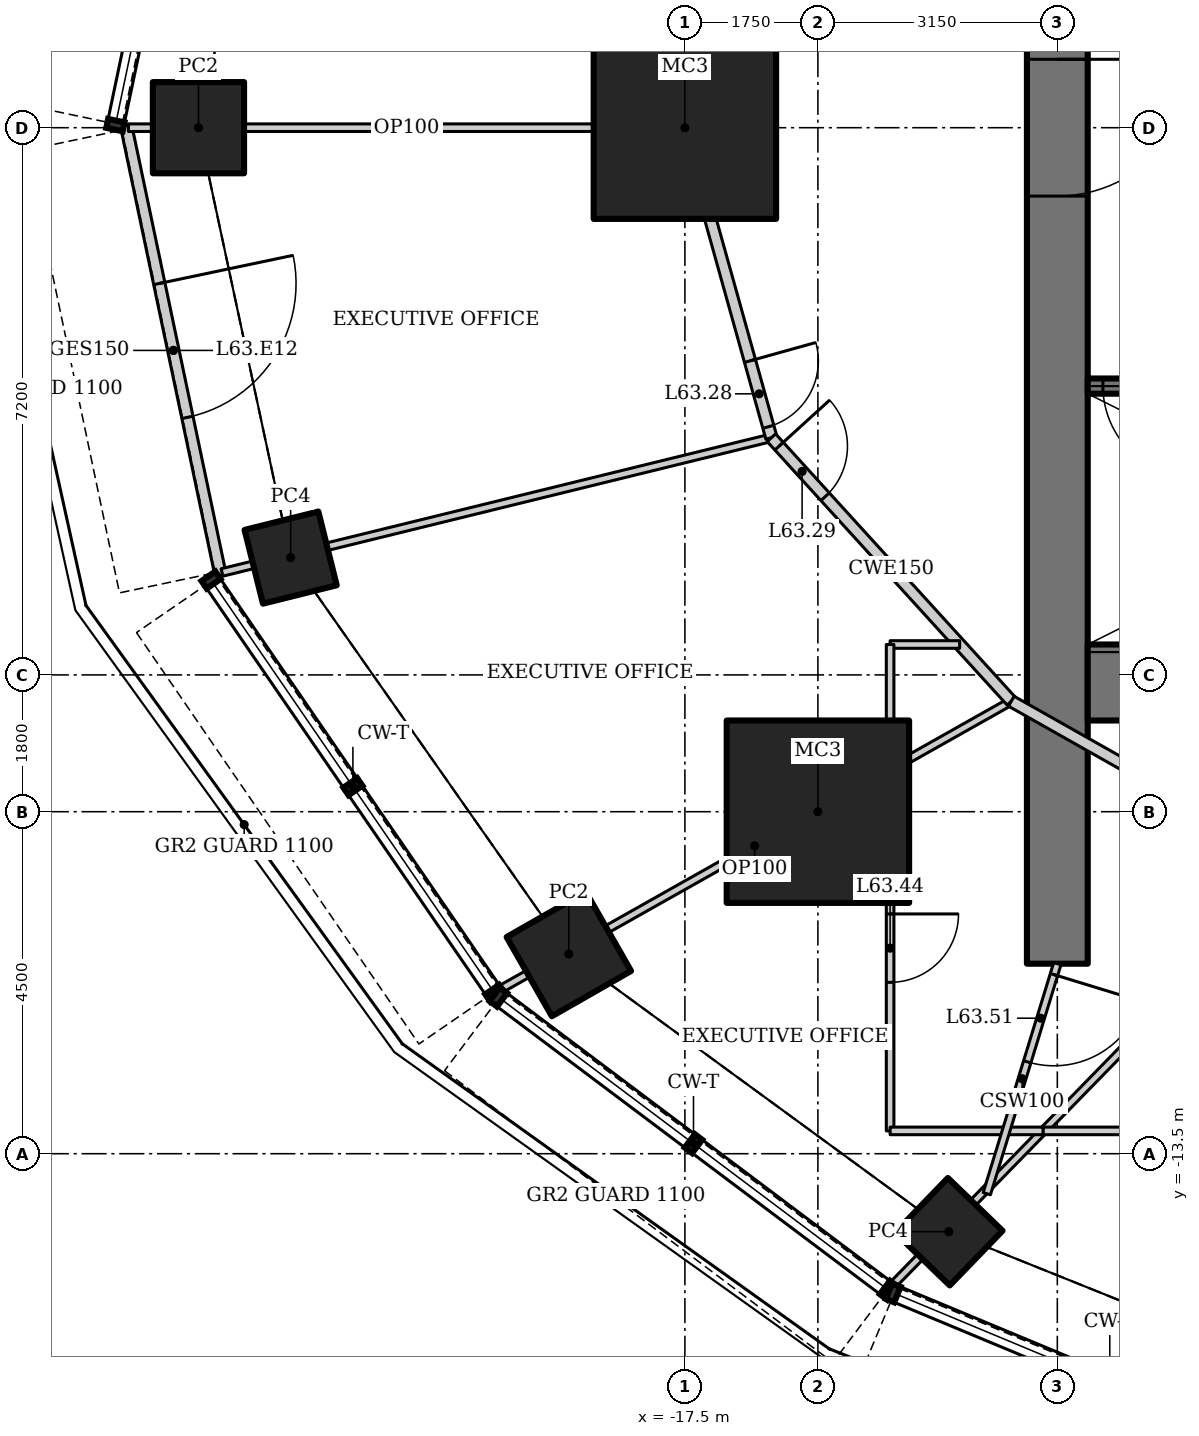
"""IFC4 building model, lengths in metres.
Left out: names, types, materials, properties, quantities, classifications, styles, units other than length and angle.
Written with IfcOpenShell. Run it as: python <this file> out.ifc"""

import sys

from ifc_helpers import new_model, si_unit, direction, frame, frame_2d, origin, origin_2d, place, context, subcontext, project, spatial, rectangle, hollow_rectangle, extrude, element, fill, save


model = new_model("IFC4")
c1 = context("Model", 3, precision=1e-05, world=origin(), true_north=direction((0.0, 1.0)))
c2 = subcontext(c1, "Body", "Model", "MODEL_VIEW")
j1 = project(units=[si_unit("LENGTHUNIT", "METRE"), si_unit("PLANEANGLEUNIT", "RADIAN")], contexts=[c1])
p1 = place(None, origin())
s1 = spatial("IfcSite", under=j1, at=p1, CompositionType="ELEMENT")
p2 = place(p1, origin())
s2 = spatial("IfcBuilding", under=s1, at=p2, CompositionType="ELEMENT")
p3 = place(p2, frame((0.0, 0.0, 270.4)))
s3 = spatial("IfcBuildingStorey", under=s2, at=p3, CompositionType="ELEMENT", Elevation=270.4)
for number, where, z_axis, x_axis in (
    (1, (-17.5, 0.0, 0.0), (0.0, 0.0, 1.0), (1.0, 0.0, 0.0)),
    (2, (-15.75, -9.0, 0.0), (0.0, 0.0, 1.0), (1.0, 0.0, 0.0)),
):
    element("IfcColumn", number, at=place(p3, frame(where, z_axis=z_axis, x_axis=x_axis)), inside=s3, PredefinedType="COLUMN", context=c2, shape_type="SweptSolid", body=[
        extrude(hollow_rectangle(XDim=2.4, YDim=2.4, WallThickness=0.12, at=origin_2d()), origin(), (0.0, 0.0, 1.0), 4.5),
    ])
p4 = place(p3, frame((-23.9, 0.0, 1.059), z_axis=(0.0, 0.0, 1.0), x_axis=(1.0, 0.0, 0.0)))
e3 = element("IfcColumn", 3, at=p4, inside=s3, PredefinedType="COLUMN", context=c2, shape_type="SweptSolid", body=[
    extrude(hollow_rectangle(XDim=1.2, YDim=1.2, WallThickness=0.1, at=origin_2d()), origin(), (0.0, 0.0, 1.0), 3.441),
])
p5 = place(p3, frame((-22.687, -5.656, 0.892), z_axis=(0.0, 0.0, 1.0), x_axis=(0.970295726276, 0.2419218956, 0.0)))
e4 = element("IfcColumn", 4, at=p5, inside=s3, PredefinedType="COLUMN", context=c2, shape_type="SweptSolid", body=[
    extrude(hollow_rectangle(XDim=1.0, YDim=1.0, WallThickness=0.08, at=origin_2d()), origin(), (0.0, 0.0, 1.0), 3.608),
])
p6 = place(p3, frame((-19.027, -10.873, 1.103), z_axis=(0.0, 0.0, 1.0), x_axis=(0.86824298017, 0.496139221777, 0.0)))
e5 = element("IfcColumn", 5, at=p6, inside=s3, PredefinedType="COLUMN", context=c2, shape_type="SweptSolid", body=[
    extrude(hollow_rectangle(XDim=1.2, YDim=1.2, WallThickness=0.1, at=origin_2d()), origin(), (0.0, 0.0, 1.0), 3.397),
])
p7 = place(p3, frame((-14.028, -14.526, 0.947), z_axis=(0.0, 0.0, 1.0), x_axis=(0.694658370459, 0.719339800339, 0.0)))
e6 = element("IfcColumn", 6, at=p7, inside=s3, PredefinedType="COLUMN", context=c2, shape_type="SweptSolid", body=[
    extrude(hollow_rectangle(XDim=1.0, YDim=1.0, WallThickness=0.08, at=origin_2d()), origin(), (0.0, 0.0, 1.0), 3.553),
])
p8 = place(p3, frame((-12.6, 11.0, 0.0), z_axis=(0.0, 0.0, 1.0), x_axis=(0.0, -1.0, 0.0)))
e7 = element("IfcWall", 7, at=p8, inside=s3, PredefinedType="SHEAR", context=c2, shape_type="SweptSolid", body=[
    extrude(rectangle(XDim=22.0, YDim=0.8, at=frame_2d((11.0, 0.0))), origin(), (0.0, 0.0, 1.0), 4.5),
])
p9 = place(p8, frame((10.1, 0.0, 0.0)))
e8 = element("IfcOpeningElement", 8, at=p9, cuts=e7, PredefinedType="OPENING", context=c2, shape_type="SweptSolid", body=[
    extrude(rectangle(XDim=1.8, YDim=2.1, at=frame_2d((0.9, 1.05))), frame((0.0, 0.41, 0.0), z_axis=(0.0, -1.0, 0.0), x_axis=(1.0, 0.0, 0.0)), (0.0, 0.0, 1.0), 0.82),
])
p10 = place(p3, frame((-12.2, -7.3, 0.0), z_axis=(0.0, 0.0, 1.0), x_axis=(1.0, 0.0, 0.0)))
e9 = element("IfcWall", 9, at=p10, inside=s3, PredefinedType="SHEAR", context=c2, shape_type="SweptSolid", body=[
    extrude(rectangle(XDim=24.4, YDim=1.0, at=frame_2d((12.2, 0.0))), origin(), (0.0, 0.0, 1.0), 4.5),
])
p11 = place(p3, frame((-5.6, -3.4, 0.0), z_axis=(0.0, 0.0, 1.0), x_axis=(-1.0, 0.0, 0.0)))
e10 = element("IfcWall", 10, at=p11, inside=s3, PredefinedType="SHEAR", context=c2, shape_type="SweptSolid", body=[
    extrude(rectangle(XDim=6.6, YDim=0.2, at=frame_2d((3.3, 0.0))), origin(), (0.0, 0.0, 1.0), 4.5),
])
p12 = place(p11, frame((5.2, 0.0, 0.0)))
e11 = element("IfcOpeningElement", 11, at=p12, cuts=e10, PredefinedType="OPENING", context=c2, shape_type="SweptSolid", body=[
    extrude(rectangle(XDim=1.2, YDim=2.1, at=frame_2d((0.6, 1.05))), frame((0.0, 0.11, 0.0), z_axis=(0.0, -1.0, 0.0), x_axis=(1.0, 0.0, 0.0)), (0.0, 0.0, 1.0), 0.22),
])
p13 = place(p3, frame((-24.853, 0.031, 0.0), z_axis=(0.0, 0.0, 1.0), x_axis=(0.20581124117, -0.978591709043, 0.0)))
e12 = element("IfcWall", 12, at=p13, inside=s3, PredefinedType="ELEMENTEDWALL", context=c2, shape_type="SweptSolid", body=[
    extrude(rectangle(XDim=6.052, YDim=0.15, at=frame_2d((3.026, 0.0))), origin(), (0.0, 0.0, 1.0), 4.35),
])
p14 = place(p13, frame((2.126, 0.0, 0.0)))
e13 = element("IfcOpeningElement", 13, at=p14, cuts=e12, PredefinedType="OPENING", context=c2, shape_type="SweptSolid", body=[
    extrude(rectangle(XDim=1.8, YDim=2.4, at=frame_2d((0.9, 1.2))), frame((0.0, 0.085, 0.0), z_axis=(0.0, -1.0, 0.0), x_axis=(1.0, 0.0, 0.0)), (0.0, 0.0, 1.0), 0.17),
])
p15 = place(p3, frame((-24.821, 0.0, 0.0), z_axis=(0.0, 0.0, 1.0), x_axis=(1.0, 0.0, 0.0)))
e14 = element("IfcWall", 14, at=p15, inside=s3, PredefinedType="PARTITIONING", context=c2, shape_type="SweptSolid", body=[
    extrude(rectangle(XDim=7.321, YDim=0.1, at=frame_2d((3.661, 0.0))), origin(), (0.0, 0.0, 1.0), 3.738),
])
p16 = place(p3, frame((-23.59, -5.852, 0.0), z_axis=(0.0, 0.0, 1.0), x_axis=(0.971221010054, 0.238180078155, 0.0)))
e15 = element("IfcWall", 15, at=p16, inside=s3, PredefinedType="PARTITIONING", context=c2, shape_type="SweptSolid", body=[
    extrude(rectangle(XDim=7.443, YDim=0.1, at=frame_2d((3.721, 0.0))), origin(), (0.0, 0.0, 1.0), 3.408),
])
p17 = place(p3, frame((-19.959, -11.355, 0.0), z_axis=(0.0, 0.0, 1.0), x_axis=(0.871035125561, 0.491220734537, 0.0)))
e16 = element("IfcWall", 16, at=p17, inside=s3, PredefinedType="PARTITIONING", context=c2, shape_type="SweptSolid", body=[
    extrude(rectangle(XDim=7.753, YDim=0.1, at=frame_2d((3.877, 0.0))), origin(), (0.0, 0.0, 1.0), 3.824),
])
p18 = place(p3, frame((-14.789, -15.251, 0.0), z_axis=(0.0, 0.0, 1.0), x_axis=(0.698752653188, 0.71536335499, 0.0)))
e17 = element("IfcWall", 17, at=p18, inside=s3, PredefinedType="PARTITIONING", context=c2, shape_type="SweptSolid", body=[
    extrude(rectangle(XDim=7.746, YDim=0.1, at=frame_2d((3.873, 0.0))), origin(), (0.0, 0.0, 1.0), 3.723),
])
p19 = place(p3, frame((-16.362, 4.08, 0.0), z_axis=(0.0, 0.0, 1.0), x_axis=(-0.268731808547, -0.963215040931, 0.0)))
e18 = element("IfcWall", 18, at=p19, inside=s3, PredefinedType="PARTITIONING", context=c2, shape_type="SweptSolid", body=[
    extrude(rectangle(XDim=4.235, YDim=0.15, at=frame_2d((2.118, 0.0))), origin(), (0.0, 0.0, 1.0), 4.35),
])
p20 = place(p19, frame((0.15, 0.0, 0.0)))
e19 = element("IfcOpeningElement", 19, at=p20, cuts=e18, PredefinedType="OPENING", context=c2, shape_type="SweptSolid", body=[
    extrude(rectangle(XDim=0.9, YDim=2.1, at=frame_2d((0.45, 1.05))), frame((0.0, 0.085, 0.0), z_axis=(0.0, -1.0, 0.0), x_axis=(1.0, 0.0, 0.0)), (0.0, 0.0, 1.0), 0.17),
])
p21 = place(p3, frame((-17.5, 0.0, 0.0), z_axis=(0.0, 0.0, 1.0), x_axis=(0.268731808547, -0.963215040931, 0.0)))
e20 = element("IfcWall", 20, at=p21, inside=s3, PredefinedType="PARTITIONING", context=c2, shape_type="SweptSolid", body=[
    extrude(rectangle(XDim=4.235, YDim=0.15, at=frame_2d((2.118, 0.0))), origin(), (0.0, 0.0, 1.0), 4.35),
])
p22 = place(p21, frame((3.185, 0.0, 0.0)))
e21 = element("IfcOpeningElement", 21, at=p22, cuts=e20, PredefinedType="OPENING", context=c2, shape_type="SweptSolid", body=[
    extrude(rectangle(XDim=0.9, YDim=2.1, at=frame_2d((0.45, 1.05))), frame((0.0, 0.085, 0.0), z_axis=(0.0, -1.0, 0.0), x_axis=(1.0, 0.0, 0.0)), (0.0, 0.0, 1.0), 0.17),
])
p23 = place(p3, frame((-16.362, -4.08, 0.0), z_axis=(0.0, 0.0, 1.0), x_axis=(0.67323765707, -0.739426167445, 0.0)))
e22 = element("IfcWall", 22, at=p23, inside=s3, PredefinedType="PARTITIONING", context=c2, shape_type="SweptSolid", body=[
    extrude(rectangle(XDim=4.688, YDim=0.15, at=frame_2d((2.344, 0.0))), origin(), (0.0, 0.0, 1.0), 4.35),
])
p24 = place(p23, frame((0.15, 0.0, 0.0)))
e23 = element("IfcOpeningElement", 23, at=p24, cuts=e22, PredefinedType="OPENING", context=c2, shape_type="SweptSolid", body=[
    extrude(rectangle(XDim=0.9, YDim=2.1, at=frame_2d((0.45, 1.05))), frame((0.0, 0.085, 0.0), z_axis=(0.0, -1.0, 0.0), x_axis=(1.0, 0.0, 0.0)), (0.0, 0.0, 1.0), 0.17),
])
p25 = place(p3, frame((-13.206, -7.546, 0.0), z_axis=(0.0, 0.0, 1.0), x_axis=(0.870593853694, -0.492002379984, 0.0)))
e24 = element("IfcWall", 24, at=p25, inside=s3, PredefinedType="PARTITIONING", context=c2, shape_type="SweptSolid", body=[
    extrude(rectangle(XDim=4.398, YDim=0.15, at=frame_2d((2.199, 0.0))), origin(), (0.0, 0.0, 1.0), 4.35),
])
p26 = place(p25, frame((3.348, 0.0, 0.0)))
e25 = element("IfcOpeningElement", 25, at=p26, cuts=e24, PredefinedType="OPENING", context=c2, shape_type="SweptSolid", body=[
    extrude(rectangle(XDim=0.9, YDim=2.1, at=frame_2d((0.45, 1.05))), frame((0.0, 0.085, 0.0), z_axis=(0.0, -1.0, 0.0), x_axis=(1.0, 0.0, 0.0)), (0.0, 0.0, 1.0), 0.17),
])
p27 = place(p3, frame((-13.885, -6.8, 0.0), z_axis=(0.0, 0.0, 1.0), x_axis=(-1.0, 0.0, 0.0)))
e26 = element("IfcWall", 26, at=p27, inside=s3, PredefinedType="PARTITIONING", context=c2, shape_type="SweptSolid", body=[
    extrude(rectangle(XDim=0.915, YDim=0.1, at=frame_2d((0.458, 0.0))), origin(), (0.0, 0.0, 1.0), 4.35),
])
p28 = place(p3, frame((-14.8, -6.8, 0.0), z_axis=(0.0, 0.0, 1.0), x_axis=(0.0, -1.0, 0.0)))
e27 = element("IfcWall", 27, at=p28, inside=s3, PredefinedType="PARTITIONING", context=c2, shape_type="SweptSolid", body=[
    extrude(rectangle(XDim=1.645, YDim=0.1, at=frame_2d((0.823, 0.0))), origin(), (0.0, 0.0, 1.0), 4.35),
])
p29 = place(p3, frame((-14.8, -8.445, 0.0), z_axis=(0.0, 0.0, 1.0), x_axis=(0.0, -1.0, 0.0)))
e28 = element("IfcWall", 28, at=p29, inside=s3, PredefinedType="PARTITIONING", context=c2, shape_type="SweptSolid", body=[
    extrude(rectangle(XDim=4.755, YDim=0.1, at=frame_2d((2.377, 0.0))), origin(), (0.0, 0.0, 1.0), 4.35),
])
p30 = place(p29, frame((1.9, 0.0, 0.0)))
e29 = element("IfcOpeningElement", 29, at=p30, cuts=e28, PredefinedType="OPENING", context=c2, shape_type="SweptSolid", body=[
    extrude(rectangle(XDim=0.9, YDim=2.1, at=frame_2d((0.45, 1.05))), frame((0.0, 0.06, 0.0), z_axis=(0.0, -1.0, 0.0), x_axis=(1.0, 0.0, 0.0)), (0.0, 0.0, 1.0), 0.12),
])
p31 = place(p3, frame((-14.8, -13.2, 0.0), z_axis=(0.0, 0.0, 1.0), x_axis=(1.0, 0.0, 0.0)))
e30 = element("IfcWall", 30, at=p31, inside=s3, PredefinedType="PARTITIONING", context=c2, shape_type="SweptSolid", body=[
    extrude(rectangle(XDim=2.014, YDim=0.1, at=frame_2d((1.007, 0.0))), origin(), (0.0, 0.0, 1.0), 4.35),
])
p32 = place(p3, frame((-12.786, -13.2, 0.0), z_axis=(0.0, 0.0, 1.0), x_axis=(1.0, 0.0, 0.0)))
e31 = element("IfcWall", 31, at=p32, inside=s3, PredefinedType="PARTITIONING", context=c2, shape_type="SweptSolid", body=[
    extrude(rectangle(XDim=2.386, YDim=0.1, at=frame_2d((1.193, 0.0))), origin(), (0.0, 0.0, 1.0), 4.35),
])
p33 = place(p3, frame((-12.6, -11.0, 0.0), z_axis=(0.0, 0.0, 1.0), x_axis=(-0.293039542174, -0.95610032252, 0.0)))
e32 = element("IfcWall", 32, at=p33, inside=s3, PredefinedType="PARTITIONING", context=c2, shape_type="SweptSolid", body=[
    extrude(rectangle(XDim=3.165, YDim=0.1, at=frame_2d((1.583, 0.0))), origin(), (0.0, 0.0, 1.0), 4.35),
])
p34 = place(p33, frame((0.15, 0.0, 0.0)))
e33 = element("IfcOpeningElement", 33, at=p34, cuts=e32, PredefinedType="OPENING", context=c2, shape_type="SweptSolid", body=[
    extrude(rectangle(XDim=1.2, YDim=2.1, at=frame_2d((0.6, 1.05))), frame((0.0, 0.06, 0.0), z_axis=(0.0, -1.0, 0.0), x_axis=(1.0, 0.0, 0.0)), (0.0, 0.0, 1.0), 0.12),
])
p35 = place(p14, origin())
e34 = element("IfcDoor", 34, at=p35, inside=s3, OperationType="DOUBLE_DOOR_DOUBLE_SWING", PredefinedType="DOOR", context=c2, shape_type="SweptSolid", body=[
    extrude(rectangle(XDim=1.8, YDim=2.4, at=frame_2d((0.9, 1.2))), frame((0.0, 0.025, 0.0), z_axis=(0.0, -1.0, 0.0), x_axis=(1.0, 0.0, 0.0)), (0.0, 0.0, 1.0), 0.05),
])
fill(e13, e34)
p36 = place(p12, origin())
e35 = element("IfcDoor", 35, at=p36, inside=s3, OperationType="SINGLE_SWING_RIGHT", PredefinedType="DOOR", context=c2, shape_type="SweptSolid", body=[
    extrude(rectangle(XDim=1.2, YDim=2.1, at=frame_2d((0.6, 1.05))), frame((0.0, 0.025, 0.0), z_axis=(0.0, -1.0, 0.0), x_axis=(1.0, 0.0, 0.0)), (0.0, 0.0, 1.0), 0.05),
])
fill(e11, e35)
p37 = place(p9, origin())
e36 = element("IfcDoor", 36, at=p37, inside=s3, OperationType="DOUBLE_DOOR_DOUBLE_SWING", PredefinedType="DOOR", context=c2, shape_type="SweptSolid", body=[
    extrude(rectangle(XDim=1.8, YDim=2.1, at=frame_2d((0.9, 1.05))), frame((0.0, 0.025, 0.0), z_axis=(0.0, -1.0, 0.0), x_axis=(1.0, 0.0, 0.0)), (0.0, 0.0, 1.0), 0.05),
])
fill(e8, e36)
p38 = place(p22, origin())
e37 = element("IfcDoor", 37, at=p38, inside=s3, OperationType="SINGLE_SWING_LEFT", PredefinedType="DOOR", context=c2, shape_type="SweptSolid", body=[
    extrude(rectangle(XDim=0.9, YDim=2.1, at=frame_2d((0.45, 1.05))), frame((0.0, 0.025, 0.0), z_axis=(0.0, -1.0, 0.0), x_axis=(1.0, 0.0, 0.0)), (0.0, 0.0, 1.0), 0.05),
])
fill(e21, e37)
p39 = place(p24, origin())
e38 = element("IfcDoor", 38, at=p39, inside=s3, OperationType="SINGLE_SWING_LEFT", PredefinedType="DOOR", context=c2, shape_type="SweptSolid", body=[
    extrude(rectangle(XDim=0.9, YDim=2.1, at=frame_2d((0.45, 1.05))), frame((0.0, 0.025, 0.0), z_axis=(0.0, -1.0, 0.0), x_axis=(1.0, 0.0, 0.0)), (0.0, 0.0, 1.0), 0.05),
])
fill(e23, e38)
p40 = place(p30, origin())
e39 = element("IfcDoor", 39, at=p40, inside=s3, OperationType="SINGLE_SWING_LEFT", PredefinedType="DOOR", context=c2, shape_type="SweptSolid", body=[
    extrude(rectangle(XDim=0.9, YDim=2.1, at=frame_2d((0.45, 1.05))), frame((0.0, 0.025, 0.0), z_axis=(0.0, -1.0, 0.0), x_axis=(1.0, 0.0, 0.0)), (0.0, 0.0, 1.0), 0.05),
])
fill(e29, e39)
p41 = place(p34, origin())
e40 = element("IfcDoor", 40, at=p41, inside=s3, OperationType="DOUBLE_DOOR_DOUBLE_SWING", PredefinedType="DOOR", context=c2, shape_type="SweptSolid", body=[
    extrude(rectangle(XDim=1.2, YDim=2.1, at=frame_2d((0.6, 1.05))), frame((0.0, 0.025, 0.0), z_axis=(0.0, -1.0, 0.0), x_axis=(1.0, 0.0, 0.0)), (0.0, 0.0, 1.0), 0.05),
])
fill(e33, e40)
save(model, sys.argv[1])
